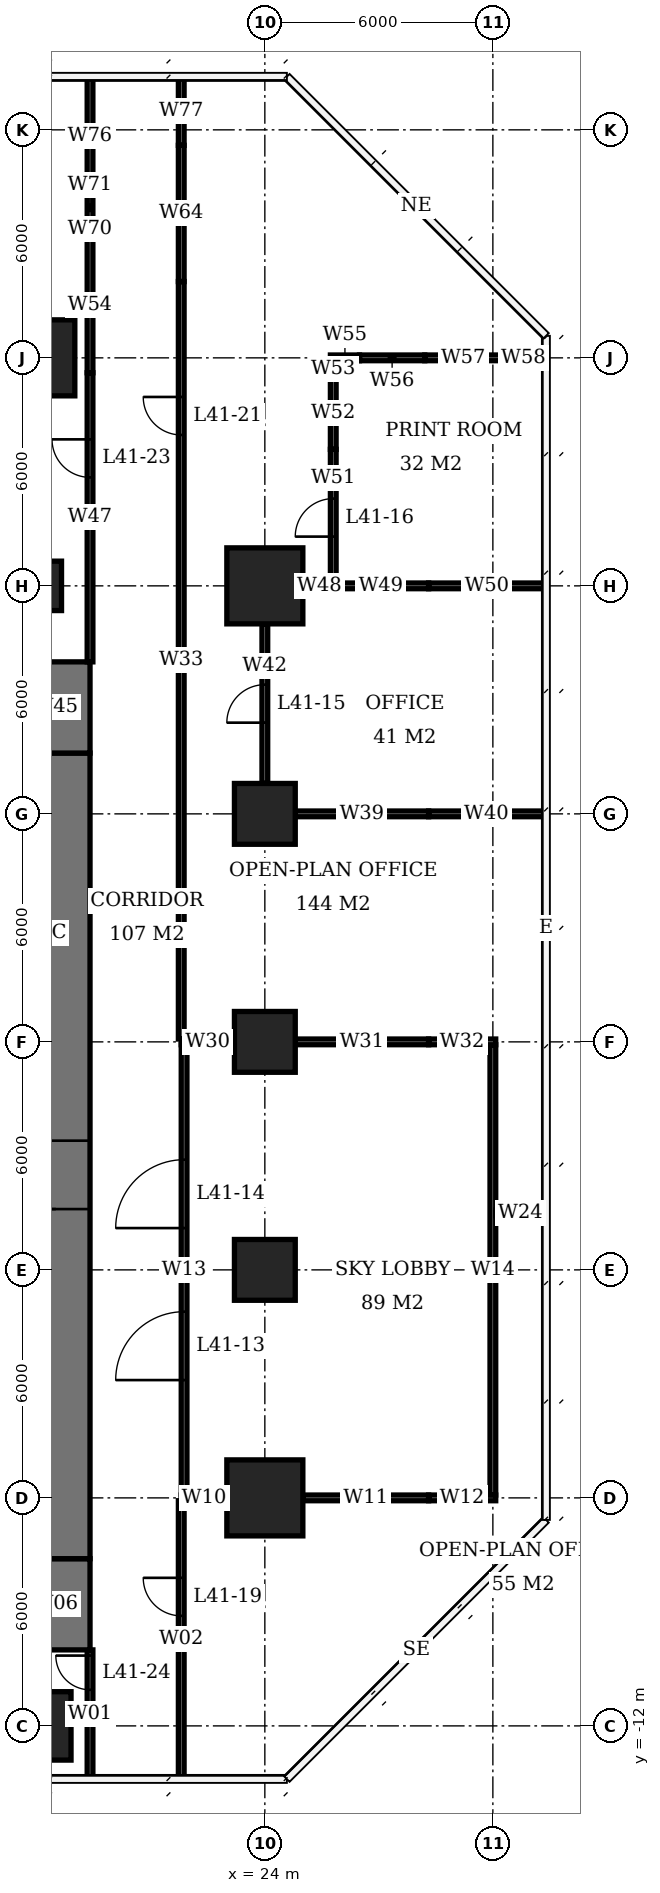
"""IFC4 building model, lengths in metres.
Left out: names, types, materials, properties, quantities, classifications, styles, units other than length and angle.
Written with IfcOpenShell. Run it as: python <this file> out.ifc"""

import sys

from ifc_helpers import new_model, si_unit, direction, frame, frame_2d, origin, origin_2d, place, context, subcontext, project, spatial, rectangle, extrude, element, fill, save


model = new_model("IFC4")
c1 = context("Model", 3, precision=1e-05, world=origin(), true_north=direction((0.0, 1.0)))
c2 = subcontext(c1, "Body", "Model", "MODEL_VIEW")
j1 = project(units=[si_unit("LENGTHUNIT", "METRE"), si_unit("PLANEANGLEUNIT", "RADIAN")], contexts=[c1])
p1 = place(None, origin())
s1 = spatial("IfcSite", under=j1, at=p1, CompositionType="ELEMENT")
p2 = place(p1, origin())
s2 = spatial("IfcBuilding", under=s1, at=p2, CompositionType="ELEMENT")
p3 = place(p2, frame((0.0, 0.0, 169.4)))
s3 = spatial("IfcBuildingStorey", under=s2, at=p3, CompositionType="ELEMENT", Elevation=169.4)
p4 = place(p3, frame((18.0, -12.0, 0.0), z_axis=(0.0, 0.0, 1.0), x_axis=(1.0, 0.0, 0.0)))
e1 = element("IfcColumn", 1, at=p4, inside=s3, PredefinedType="COLUMN", context=c2, shape_type="SweptSolid", body=[
    extrude(rectangle(XDim=1.8, YDim=1.8, at=origin_2d()), origin(), (0.0, 0.0, 1.0), 3.9),
])
p5 = place(p3, frame((18.0, 18.0, 0.0), z_axis=(0.0, 0.0, 1.0), x_axis=(1.0, 0.0, 0.0)))
e2 = element("IfcColumn", 2, at=p5, inside=s3, PredefinedType="COLUMN", context=c2, shape_type="SweptSolid", body=[
    extrude(rectangle(XDim=1.3, YDim=1.3, at=origin_2d()), origin(), (0.0, 0.0, 1.0), 3.9),
])
for number, where, z_axis, x_axis in (
    (3, (18.0, 24.0, 0.0), (0.0, 0.0, 1.0), (1.0, 0.0, 0.0)),
    (4, (24.0, -6.0, 0.0), (0.0, 0.0, 1.0), (1.0, 0.0, 0.0)),
):
    element("IfcColumn", number, at=place(p3, frame(where, z_axis=z_axis, x_axis=x_axis)), inside=s3, PredefinedType="COLUMN", context=c2, shape_type="SweptSolid", body=[
        extrude(rectangle(XDim=2.0, YDim=2.0, at=origin_2d()), origin(), (0.0, 0.0, 1.0), 3.9),
    ])
for number, where, z_axis, x_axis in (
    (5, (24.0, 0.0, 0.0), (0.0, 0.0, 1.0), (1.0, 0.0, 0.0)),
    (6, (24.0, 6.0, 0.0), (0.0, 0.0, 1.0), (1.0, 0.0, 0.0)),
    (7, (24.0, 12.0, 0.0), (0.0, 0.0, 1.0), (1.0, 0.0, 0.0)),
):
    element("IfcColumn", number, at=place(p3, frame(where, z_axis=z_axis, x_axis=x_axis)), inside=s3, PredefinedType="COLUMN", context=c2, shape_type="SweptSolid", body=[
        extrude(rectangle(XDim=1.6, YDim=1.6, at=origin_2d()), origin(), (0.0, 0.0, 1.0), 3.9),
    ])
p6 = place(p3, frame((24.0, 18.0, 0.0), z_axis=(0.0, 0.0, 1.0), x_axis=(1.0, 0.0, 0.0)))
e8 = element("IfcColumn", 8, at=p6, inside=s3, PredefinedType="COLUMN", context=c2, shape_type="SweptSolid", body=[
    extrude(rectangle(XDim=2.0, YDim=2.0, at=origin_2d()), origin(), (0.0, 0.0, 1.0), 3.9),
])
p7 = place(p3, frame((18.5, -7.6, 0.0), z_axis=(0.0, 0.0, 1.0), x_axis=(0.0, 1.0, 0.0)))
e9 = element("IfcWall", 9, at=p7, inside=s3, PredefinedType="SHEAR", context=c2, shape_type="SweptSolid", body=[
    extrude(rectangle(XDim=21.2, YDim=1.8, at=frame_2d((10.6, 0.0))), origin(), (0.0, 0.0, 1.0), 3.9),
])
p8 = place(p7, frame((9.2, 0.0, 0.0)))
e10 = element("IfcOpeningElement", 10, at=p8, cuts=e9, PredefinedType="OPENING", context=c2, shape_type="SweptSolid", body=[
    extrude(rectangle(XDim=1.8, YDim=2.4, at=frame_2d((0.9, 1.2))), frame((0.0, 0.91, 0.0), z_axis=(0.0, -1.0, 0.0), x_axis=(1.0, 0.0, 0.0)), (0.0, 0.0, 1.0), 1.82),
])
for number, where, z_axis, x_axis in (
    (11, (18.5, -10.0, 0.0), (0.0, 0.0, 1.0), (0.0, 1.0, 0.0)),
    (12, (18.5, 13.6, 0.0), (0.0, 0.0, 1.0), (0.0, 1.0, 0.0)),
):
    element("IfcWall", number, at=place(p3, frame(where, z_axis=z_axis, x_axis=x_axis)), inside=s3, PredefinedType="SHEAR", context=c2, shape_type="SweptSolid", body=[
        extrude(rectangle(XDim=2.4, YDim=1.8, at=frame_2d((1.2, 0.0))), origin(), (0.0, 0.0, 1.0), 3.9),
    ])
p9 = place(p3, frame((21.8, -6.0, 0.0), z_axis=(0.0, 0.0, 1.0), x_axis=(1.0, 0.0, 0.0)))
e13 = element("IfcWall", 13, at=p9, inside=s3, PredefinedType="PARTITIONING", context=c2, shape_type="SweptSolid", body=[
    extrude(rectangle(XDim=1.2, YDim=0.15, at=frame_2d((0.6, 0.0))), origin(), (0.0, 0.0, 1.0), 3.65),
])
p10 = place(p3, frame((25.0, -6.0, 0.0), z_axis=(0.0, 0.0, 1.0), x_axis=(1.0, 0.0, 0.0)))
e14 = element("IfcWall", 14, at=p10, inside=s3, PredefinedType="PARTITIONING", context=c2, shape_type="SweptSolid", body=[
    extrude(rectangle(XDim=3.31, YDim=0.15, at=frame_2d((1.655, 0.0))), origin(), (0.0, 0.0, 1.0), 2.65),
])
p11 = place(p3, frame((28.31, -6.0, 0.0), z_axis=(0.0, 0.0, 1.0), x_axis=(1.0, 0.0, 0.0)))
e15 = element("IfcWall", 15, at=p11, inside=s3, PredefinedType="PARTITIONING", context=c2, shape_type="SweptSolid", body=[
    extrude(rectangle(XDim=1.765, YDim=0.15, at=frame_2d((0.882, 0.0))), origin(), (0.0, 0.0, 1.0), 3.65),
])
p12 = place(p3, frame((21.8, 6.0, 0.0), z_axis=(0.0, 0.0, 1.0), x_axis=(1.0, 0.0, 0.0)))
e16 = element("IfcWall", 16, at=p12, inside=s3, PredefinedType="PARTITIONING", context=c2, shape_type="SweptSolid", body=[
    extrude(rectangle(XDim=1.4, YDim=0.15, at=frame_2d((0.7, 0.0))), origin(), (0.0, 0.0, 1.0), 3.65),
])
p13 = place(p3, frame((24.8, 6.0, 0.0), z_axis=(0.0, 0.0, 1.0), x_axis=(1.0, 0.0, 0.0)))
e17 = element("IfcWall", 17, at=p13, inside=s3, PredefinedType="PARTITIONING", context=c2, shape_type="SweptSolid", body=[
    extrude(rectangle(XDim=3.51, YDim=0.15, at=frame_2d((1.755, 0.0))), origin(), (0.0, 0.0, 1.0), 2.65),
])
p14 = place(p3, frame((28.31, 6.0, 0.0), z_axis=(0.0, 0.0, 1.0), x_axis=(1.0, 0.0, 0.0)))
e18 = element("IfcWall", 18, at=p14, inside=s3, PredefinedType="PARTITIONING", context=c2, shape_type="SweptSolid", body=[
    extrude(rectangle(XDim=1.765, YDim=0.15, at=frame_2d((0.882, 0.0))), origin(), (0.0, 0.0, 1.0), 3.65),
])
p15 = place(p3, frame((24.8, 12.0, 0.0), z_axis=(0.0, 0.0, 1.0), x_axis=(1.0, 0.0, 0.0)))
e19 = element("IfcWall", 19, at=p15, inside=s3, PredefinedType="PARTITIONING", context=c2, shape_type="SweptSolid", body=[
    extrude(rectangle(XDim=3.51, YDim=0.15, at=frame_2d((1.755, 0.0))), origin(), (0.0, 0.0, 1.0), 2.65),
])
p16 = place(p3, frame((28.31, 12.0, 0.0), z_axis=(0.0, 0.0, 1.0), x_axis=(1.0, 0.0, 0.0)))
e20 = element("IfcWall", 20, at=p16, inside=s3, PredefinedType="PARTITIONING", context=c2, shape_type="SweptSolid", body=[
    extrude(rectangle(XDim=3.04, YDim=0.15, at=frame_2d((1.52, 0.0))), origin(), (0.0, 0.0, 1.0), 3.65),
])
p17 = place(p3, frame((25.0, 18.0, 0.0), z_axis=(0.0, 0.0, 1.0), x_axis=(1.0, 0.0, 0.0)))
e21 = element("IfcWall", 21, at=p17, inside=s3, PredefinedType="PARTITIONING", context=c2, shape_type="SweptSolid", body=[
    extrude(rectangle(XDim=0.875, YDim=0.15, at=frame_2d((0.438, 0.0))), origin(), (0.0, 0.0, 1.0), 2.65),
])
p18 = place(p3, frame((25.8, 18.0, 0.0), z_axis=(0.0, 0.0, 1.0), x_axis=(1.0, 0.0, 0.0)))
e22 = element("IfcWall", 22, at=p18, inside=s3, PredefinedType="PARTITIONING", context=c2, shape_type="SweptSolid", body=[
    extrude(rectangle(XDim=2.51, YDim=0.15, at=frame_2d((1.255, 0.0))), origin(), (0.0, 0.0, 1.0), 2.65),
])
p19 = place(p3, frame((28.31, 18.0, 0.0), z_axis=(0.0, 0.0, 1.0), x_axis=(1.0, 0.0, 0.0)))
e23 = element("IfcWall", 23, at=p19, inside=s3, PredefinedType="PARTITIONING", context=c2, shape_type="SweptSolid", body=[
    extrude(rectangle(XDim=3.065, YDim=0.15, at=frame_2d((1.532, 0.0))), origin(), (0.0, 0.0, 1.0), 3.65),
])
p20 = place(p3, frame((25.725, 24.0, 0.0), z_axis=(0.0, 0.0, 1.0), x_axis=(1.0, 0.0, 0.0)))
e24 = element("IfcWall", 24, at=p20, inside=s3, PredefinedType="PARTITIONING", context=c2, shape_type="SweptSolid", body=[
    extrude(rectangle(XDim=0.765, YDim=0.15, at=frame_2d((0.382, 0.0))), origin(), (0.0, 0.0, 1.0), 2.65),
])
p21 = place(p3, frame((26.49, 24.0, 0.0), z_axis=(0.0, 0.0, 1.0), x_axis=(1.0, 0.0, 0.0)))
e25 = element("IfcWall", 25, at=p21, inside=s3, PredefinedType="PARTITIONING", context=c2, shape_type="SweptSolid", body=[
    extrude(rectangle(XDim=1.718, YDim=0.15, at=frame_2d((0.859, 0.0))), origin(), (0.0, 0.0, 1.0), 3.65),
])
p22 = place(p3, frame((28.208, 24.0, 0.0), z_axis=(0.0, 0.0, 1.0), x_axis=(1.0, 0.0, 0.0)))
e26 = element("IfcWall", 26, at=p22, inside=s3, PredefinedType="PARTITIONING", context=c2, shape_type="SweptSolid", body=[
    extrude(rectangle(XDim=2.029, YDim=0.15, at=frame_2d((1.015, 0.0))), origin(), (0.0, 0.0, 1.0), 2.65),
])
p23 = place(p3, frame((30.237, 24.0, 0.0), z_axis=(0.0, 0.0, 1.0), x_axis=(1.0, 0.0, 0.0)))
e27 = element("IfcWall", 27, at=p23, inside=s3, PredefinedType="PARTITIONING", context=c2, shape_type="SweptSolid", body=[
    extrude(rectangle(XDim=1.138, YDim=0.15, at=frame_2d((0.569, 0.0))), origin(), (0.0, 0.0, 1.0), 3.65),
])
p24 = place(p3, frame((21.875, -5.925, 0.0), z_axis=(0.0, 0.0, 1.0), x_axis=(0.0, 1.0, 0.0)))
e28 = element("IfcWall", 28, at=p24, inside=s3, PredefinedType="PARTITIONING", context=c2, shape_type="SweptSolid", body=[
    extrude(rectangle(XDim=11.85, YDim=0.15, at=frame_2d((5.925, 0.0))), origin(), (0.0, 0.0, 1.0), 3.65),
])
p25 = place(p24, frame((3.025, 0.0, 0.0)))
e29 = element("IfcOpeningElement", 29, at=p25, cuts=e28, PredefinedType="OPENING", context=c2, shape_type="SweptSolid", body=[
    extrude(rectangle(XDim=1.8, YDim=2.4, at=frame_2d((0.9, 1.2))), frame((0.0, 0.085, 0.0), z_axis=(0.0, -1.0, 0.0), x_axis=(1.0, 0.0, 0.0)), (0.0, 0.0, 1.0), 0.17),
])
p26 = place(p24, frame((7.025, 0.0, 0.0)))
e30 = element("IfcOpeningElement", 30, at=p26, cuts=e28, PredefinedType="OPENING", context=c2, shape_type="SweptSolid", body=[
    extrude(rectangle(XDim=1.8, YDim=2.4, at=frame_2d((0.9, 1.2))), frame((0.0, 0.085, 0.0), z_axis=(0.0, -1.0, 0.0), x_axis=(1.0, 0.0, 0.0)), (0.0, 0.0, 1.0), 0.17),
])
p27 = place(p3, frame((24.0, 12.8, 0.0), z_axis=(0.0, 0.0, 1.0), x_axis=(0.0, 1.0, 0.0)))
e31 = element("IfcWall", 31, at=p27, inside=s3, PredefinedType="PARTITIONING", context=c2, shape_type="SweptSolid", body=[
    extrude(rectangle(XDim=4.2, YDim=0.15, at=frame_2d((2.1, 0.0))), origin(), (0.0, 0.0, 1.0), 3.65),
])
p28 = place(p27, frame((1.6, 0.0, 0.0)))
e32 = element("IfcOpeningElement", 32, at=p28, cuts=e31, PredefinedType="OPENING", context=c2, shape_type="SweptSolid", body=[
    extrude(rectangle(XDim=1.0, YDim=2.1, at=frame_2d((0.5, 1.05))), frame((0.0, 0.085, 0.0), z_axis=(0.0, -1.0, 0.0), x_axis=(1.0, 0.0, 0.0)), (0.0, 0.0, 1.0), 0.17),
])
p29 = place(p3, frame((25.8, 18.075, 0.0), z_axis=(0.0, 0.0, 1.0), x_axis=(0.0, 1.0, 0.0)))
e33 = element("IfcWall", 33, at=p29, inside=s3, PredefinedType="PARTITIONING", context=c2, shape_type="SweptSolid", body=[
    extrude(rectangle(XDim=3.517, YDim=0.15, at=frame_2d((1.759, 0.0))), origin(), (0.0, 0.0, 1.0), 2.65),
])
p30 = place(p29, frame((1.221, 0.0, 0.0)))
e34 = element("IfcOpeningElement", 34, at=p30, cuts=e33, PredefinedType="OPENING", context=c2, shape_type="SweptSolid", body=[
    extrude(rectangle(XDim=1.0, YDim=2.1, at=frame_2d((0.5, 1.05))), frame((0.0, 0.085, 0.0), z_axis=(0.0, -1.0, 0.0), x_axis=(1.0, 0.0, 0.0)), (0.0, 0.0, 1.0), 0.17),
])
p31 = place(p3, frame((25.8, 21.592, 0.0), z_axis=(0.0, 0.0, 1.0), x_axis=(0.0, 1.0, 0.0)))
e35 = element("IfcWall", 35, at=p31, inside=s3, PredefinedType="PARTITIONING", context=c2, shape_type="SweptSolid", body=[
    extrude(rectangle(XDim=1.918, YDim=0.15, at=frame_2d((0.959, 0.0))), origin(), (0.0, 0.0, 1.0), 3.65),
])
p32 = place(p3, frame((25.8, 23.51, 0.0), z_axis=(0.0, 0.0, 1.0), x_axis=(0.0, 1.0, 0.0)))
e36 = element("IfcWall", 36, at=p32, inside=s3, PredefinedType="PARTITIONING", context=c2, shape_type="SweptSolid", body=[
    extrude(rectangle(XDim=0.415, YDim=0.15, at=frame_2d((0.208, 0.0))), origin(), (0.0, 0.0, 1.0), 2.65),
])
p33 = place(p3, frame((30.0, -5.925, 0.0), z_axis=(0.0, 0.0, 1.0), x_axis=(0.0, 1.0, 0.0)))
e37 = element("IfcWall", 37, at=p33, inside=s3, PredefinedType="PARTITIONING", context=c2, shape_type="SweptSolid", body=[
    extrude(rectangle(XDim=11.85, YDim=0.15, at=frame_2d((5.925, 0.0))), origin(), (0.0, 0.0, 1.0), 3.65),
])
p34 = place(p3, frame((19.4, -13.375, 0.0), z_axis=(0.0, 0.0, 1.0), x_axis=(0.0, 1.0, 0.0)))
e38 = element("IfcWall", 38, at=p34, inside=s3, PredefinedType="PARTITIONING", context=c2, shape_type="SweptSolid", body=[
    extrude(rectangle(XDim=3.375, YDim=0.15, at=frame_2d((1.688, 0.0))), origin(), (0.0, 0.0, 1.0), 3.65),
])
p35 = place(p34, frame((2.325, 0.0, 0.0)))
e39 = element("IfcOpeningElement", 39, at=p35, cuts=e38, PredefinedType="OPENING", context=c2, shape_type="SweptSolid", body=[
    extrude(rectangle(XDim=0.9, YDim=2.1, at=frame_2d((0.45, 1.05))), frame((0.0, 0.085, 0.0), z_axis=(0.0, -1.0, 0.0), x_axis=(1.0, 0.0, 0.0)), (0.0, 0.0, 1.0), 0.17),
])
p36 = place(p3, frame((19.4, 16.0, 0.0), z_axis=(0.0, 0.0, 1.0), x_axis=(0.0, 1.0, 0.0)))
e40 = element("IfcWall", 40, at=p36, inside=s3, PredefinedType="PARTITIONING", context=c2, shape_type="SweptSolid", body=[
    extrude(rectangle(XDim=7.608, YDim=0.15, at=frame_2d((3.804, 0.0))), origin(), (0.0, 0.0, 1.0), 3.65),
])
p37 = place(p36, frame((4.855, 0.0, 0.0)))
e41 = element("IfcOpeningElement", 41, at=p37, cuts=e40, PredefinedType="OPENING", context=c2, shape_type="SweptSolid", body=[
    extrude(rectangle(XDim=1.0, YDim=2.1, at=frame_2d((0.5, 1.05))), frame((0.0, 0.085, 0.0), z_axis=(0.0, -1.0, 0.0), x_axis=(1.0, 0.0, 0.0)), (0.0, 0.0, 1.0), 0.17),
])
p38 = place(p3, frame((19.4, 23.608, 0.0), z_axis=(0.0, 0.0, 1.0), x_axis=(0.0, 1.0, 0.0)))
e42 = element("IfcWall", 42, at=p38, inside=s3, PredefinedType="PARTITIONING", context=c2, shape_type="SweptSolid", body=[
    extrude(rectangle(XDim=3.584, YDim=0.15, at=frame_2d((1.792, 0.0))), origin(), (0.0, 0.0, 1.0), 2.65),
])
p39 = place(p3, frame((19.4, 27.192, 0.0), z_axis=(0.0, 0.0, 1.0), x_axis=(0.0, 1.0, 0.0)))
e43 = element("IfcWall", 43, at=p39, inside=s3, PredefinedType="PARTITIONING", context=c2, shape_type="SweptSolid", body=[
    extrude(rectangle(XDim=0.398, YDim=0.15, at=frame_2d((0.199, 0.0))), origin(), (0.0, 0.0, 1.0), 3.65),
])
p40 = place(p3, frame((19.4, 27.59, 0.0), z_axis=(0.0, 0.0, 1.0), x_axis=(0.0, 1.0, 0.0)))
e44 = element("IfcWall", 44, at=p40, inside=s3, PredefinedType="PARTITIONING", context=c2, shape_type="SweptSolid", body=[
    extrude(rectangle(XDim=0.72, YDim=0.15, at=frame_2d((0.36, 0.0))), origin(), (0.0, 0.0, 1.0), 2.65),
])
p41 = place(p3, frame((19.4, 28.31, 0.0), z_axis=(0.0, 0.0, 1.0), x_axis=(0.0, 1.0, 0.0)))
e45 = element("IfcWall", 45, at=p41, inside=s3, PredefinedType="PARTITIONING", context=c2, shape_type="SweptSolid", body=[
    extrude(rectangle(XDim=3.065, YDim=0.15, at=frame_2d((1.532, 0.0))), origin(), (0.0, 0.0, 1.0), 3.65),
])
p42 = place(p3, frame((21.8, -13.375, 0.0), z_axis=(0.0, 0.0, 1.0), x_axis=(0.0, 1.0, 0.0)))
e46 = element("IfcWall", 46, at=p42, inside=s3, PredefinedType="PARTITIONING", context=c2, shape_type="SweptSolid", body=[
    extrude(rectangle(XDim=7.3, YDim=0.15, at=frame_2d((3.65, 0.0))), origin(), (0.0, 0.0, 1.0), 3.65),
])
p43 = place(p42, frame((4.271, 0.0, 0.0)))
e47 = element("IfcOpeningElement", 47, at=p43, cuts=e46, PredefinedType="OPENING", context=c2, shape_type="SweptSolid", body=[
    extrude(rectangle(XDim=1.0, YDim=2.1, at=frame_2d((0.5, 1.05))), frame((0.0, 0.085, 0.0), z_axis=(0.0, -1.0, 0.0), x_axis=(1.0, 0.0, 0.0)), (0.0, 0.0, 1.0), 0.17),
])
p44 = place(p3, frame((21.8, 6.075, 0.0), z_axis=(0.0, 0.0, 1.0), x_axis=(0.0, 1.0, 0.0)))
e48 = element("IfcWall", 48, at=p44, inside=s3, PredefinedType="PARTITIONING", context=c2, shape_type="SweptSolid", body=[
    extrude(rectangle(XDim=19.933, YDim=0.15, at=frame_2d((9.966, 0.0))), origin(), (0.0, 0.0, 1.0), 3.65),
])
p45 = place(p44, frame((15.896, 0.0, 0.0)))
e49 = element("IfcOpeningElement", 49, at=p45, cuts=e48, PredefinedType="OPENING", context=c2, shape_type="SweptSolid", body=[
    extrude(rectangle(XDim=1.0, YDim=2.1, at=frame_2d((0.5, 1.05))), frame((0.0, 0.085, 0.0), z_axis=(0.0, -1.0, 0.0), x_axis=(1.0, 0.0, 0.0)), (0.0, 0.0, 1.0), 0.17),
])
p46 = place(p3, frame((21.8, 26.008, 0.0), z_axis=(0.0, 0.0, 1.0), x_axis=(0.0, 1.0, 0.0)))
e50 = element("IfcWall", 50, at=p46, inside=s3, PredefinedType="PARTITIONING", context=c2, shape_type="SweptSolid", body=[
    extrude(rectangle(XDim=3.584, YDim=0.15, at=frame_2d((1.792, 0.0))), origin(), (0.0, 0.0, 1.0), 2.65),
])
p47 = place(p3, frame((21.8, 29.592, 0.0), z_axis=(0.0, 0.0, 1.0), x_axis=(0.0, 1.0, 0.0)))
e51 = element("IfcWall", 51, at=p47, inside=s3, PredefinedType="PARTITIONING", context=c2, shape_type="SweptSolid", body=[
    extrude(rectangle(XDim=1.783, YDim=0.15, at=frame_2d((0.892, 0.0))), origin(), (0.0, 0.0, 1.0), 3.65),
])
p48 = place(p3, frame((30.075, 1.5, 0.0), z_axis=(0.0, 0.0, 1.0), x_axis=(1.0, 0.0, 0.0)))
e52 = element("IfcWall", 52, at=p48, inside=s3, PredefinedType="PARTITIONING", context=c2, shape_type="SweptSolid", body=[
    extrude(rectangle(XDim=1.3, YDim=0.15, at=frame_2d((0.65, 0.0))), origin(), (0.0, 0.0, 1.0), 3.65),
])
p49 = place(p8, origin())
e53 = element("IfcDoor", 53, at=p49, inside=s3, OperationType="DOUBLE_DOOR_SINGLE_SWING", PredefinedType="DOOR", context=c2, shape_type="SweptSolid", body=[
    extrude(rectangle(XDim=1.8, YDim=2.4, at=frame_2d((0.9, 1.2))), frame((0.0, 0.025, 0.0), z_axis=(0.0, -1.0, 0.0), x_axis=(1.0, 0.0, 0.0)), (0.0, 0.0, 1.0), 0.05),
])
fill(e10, e53)
p50 = place(p25, origin())
e54 = element("IfcDoor", 54, at=p50, inside=s3, OperationType="DOUBLE_DOOR_SINGLE_SWING", PredefinedType="DOOR", context=c2, shape_type="SweptSolid", body=[
    extrude(rectangle(XDim=1.8, YDim=2.4, at=frame_2d((0.9, 1.2))), frame((0.0, 0.025, 0.0), z_axis=(0.0, -1.0, 0.0), x_axis=(1.0, 0.0, 0.0)), (0.0, 0.0, 1.0), 0.05),
])
fill(e29, e54)
p51 = place(p26, origin())
e55 = element("IfcDoor", 55, at=p51, inside=s3, OperationType="DOUBLE_DOOR_SINGLE_SWING", PredefinedType="DOOR", context=c2, shape_type="SweptSolid", body=[
    extrude(rectangle(XDim=1.8, YDim=2.4, at=frame_2d((0.9, 1.2))), frame((0.0, 0.025, 0.0), z_axis=(0.0, -1.0, 0.0), x_axis=(1.0, 0.0, 0.0)), (0.0, 0.0, 1.0), 0.05),
])
fill(e30, e55)
p52 = place(p28, origin())
e56 = element("IfcDoor", 56, at=p52, inside=s3, OperationType="SINGLE_SWING_LEFT", PredefinedType="DOOR", context=c2, shape_type="SweptSolid", body=[
    extrude(rectangle(XDim=1.0, YDim=2.1, at=frame_2d((0.5, 1.05))), frame((0.0, 0.025, 0.0), z_axis=(0.0, -1.0, 0.0), x_axis=(1.0, 0.0, 0.0)), (0.0, 0.0, 1.0), 0.05),
])
fill(e32, e56)
p53 = place(p30, origin())
e57 = element("IfcDoor", 57, at=p53, inside=s3, OperationType="SINGLE_SWING_LEFT", PredefinedType="DOOR", context=c2, shape_type="SweptSolid", body=[
    extrude(rectangle(XDim=1.0, YDim=2.1, at=frame_2d((0.5, 1.05))), frame((0.0, 0.025, 0.0), z_axis=(0.0, -1.0, 0.0), x_axis=(1.0, 0.0, 0.0)), (0.0, 0.0, 1.0), 0.05),
])
fill(e34, e57)
p54 = place(p43, origin())
e58 = element("IfcDoor", 58, at=p54, inside=s3, OperationType="SINGLE_SWING_RIGHT", PredefinedType="DOOR", context=c2, shape_type="SweptSolid", body=[
    extrude(rectangle(XDim=1.0, YDim=2.1, at=frame_2d((0.5, 1.05))), frame((0.0, 0.025, 0.0), z_axis=(0.0, -1.0, 0.0), x_axis=(1.0, 0.0, 0.0)), (0.0, 0.0, 1.0), 0.05),
])
fill(e47, e58)
p55 = place(p45, origin())
e59 = element("IfcDoor", 59, at=p55, inside=s3, OperationType="SINGLE_SWING_RIGHT", PredefinedType="DOOR", context=c2, shape_type="SweptSolid", body=[
    extrude(rectangle(XDim=1.0, YDim=2.1, at=frame_2d((0.5, 1.05))), frame((0.0, 0.025, 0.0), z_axis=(0.0, -1.0, 0.0), x_axis=(1.0, 0.0, 0.0)), (0.0, 0.0, 1.0), 0.05),
])
fill(e49, e59)
p56 = place(p37, origin())
e60 = element("IfcDoor", 60, at=p56, inside=s3, OperationType="SINGLE_SWING_RIGHT", PredefinedType="DOOR", context=c2, shape_type="SweptSolid", body=[
    extrude(rectangle(XDim=1.0, YDim=2.1, at=frame_2d((0.5, 1.05))), frame((0.0, 0.025, 0.0), z_axis=(0.0, -1.0, 0.0), x_axis=(1.0, 0.0, 0.0)), (0.0, 0.0, 1.0), 0.05),
])
fill(e41, e60)
p57 = place(p35, origin())
e61 = element("IfcDoor", 61, at=p57, inside=s3, OperationType="SINGLE_SWING_RIGHT", PredefinedType="DOOR", context=c2, shape_type="SweptSolid", body=[
    extrude(rectangle(XDim=0.9, YDim=2.1, at=frame_2d((0.45, 1.05))), frame((0.0, 0.025, 0.0), z_axis=(0.0, -1.0, 0.0), x_axis=(1.0, 0.0, 0.0)), (0.0, 0.0, 1.0), 0.05),
])
fill(e39, e61)
save(model, sys.argv[1])
